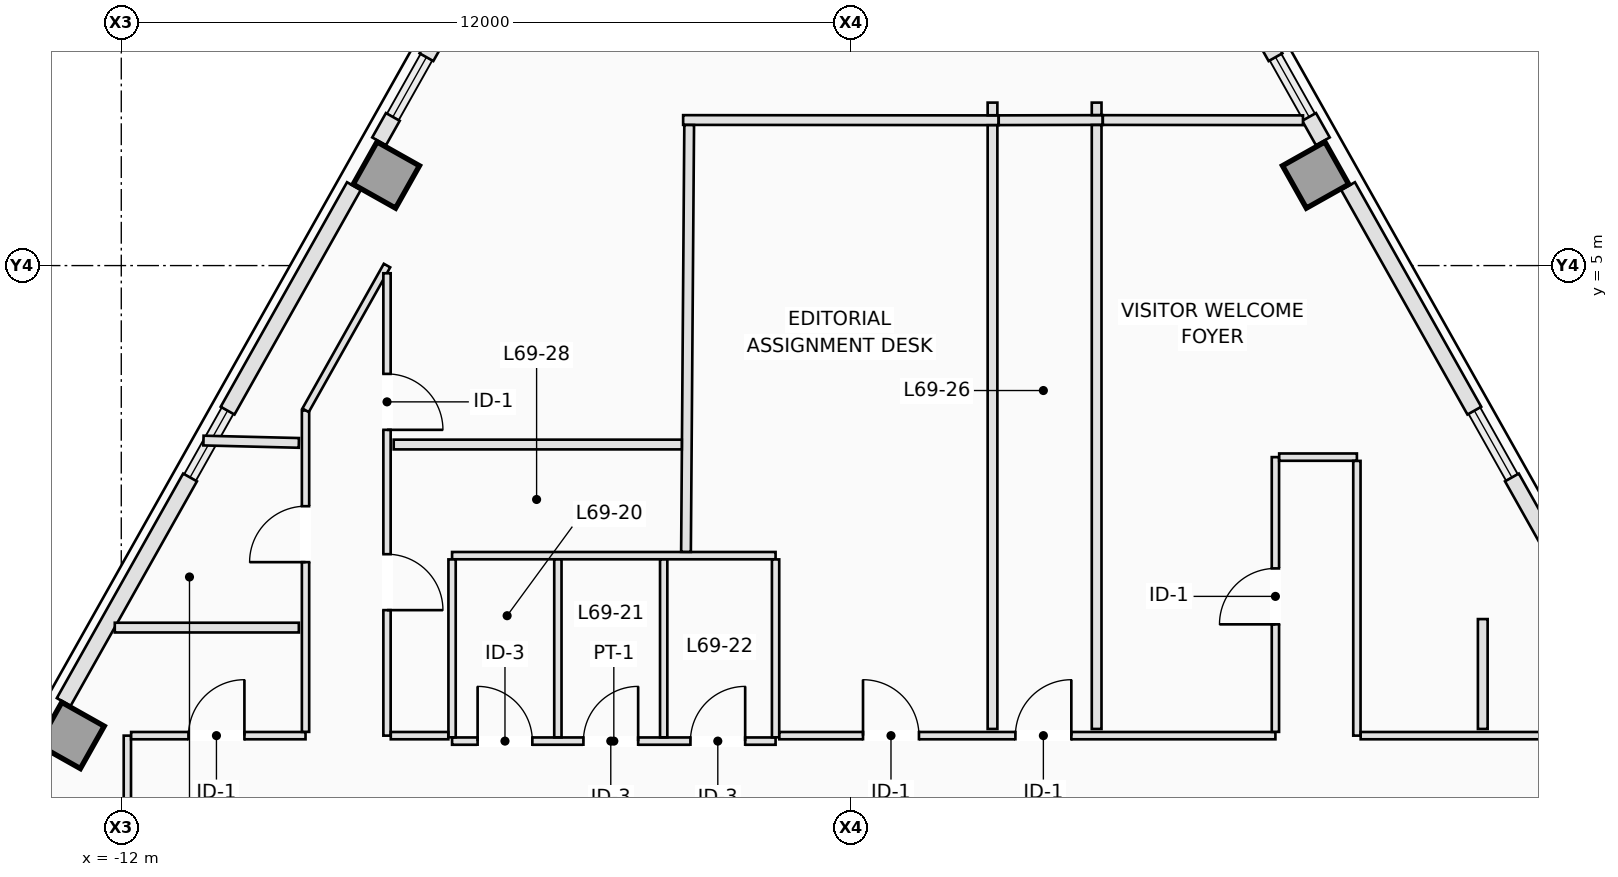
"""IFC4 building model, lengths in metres.
Left out: names, types, materials, properties, quantities, classifications, styles, units other than length and angle.
Written with IfcOpenShell. Run it as: python <this file> out.ifc"""

import sys

from ifc_helpers import new_model, si_unit, direction, frame, frame_2d, origin, origin_2d, place, context, subcontext, project, spatial, rectangle, extrude, element, fill, save


model = new_model("IFC4")
c1 = context("Model", 3, precision=1e-05, world=origin(), true_north=direction((0.0, 1.0)))
c2 = subcontext(c1, "Body", "Model", "MODEL_VIEW")
j1 = project(units=[si_unit("LENGTHUNIT", "METRE"), si_unit("PLANEANGLEUNIT", "RADIAN")], contexts=[c1])
p1 = place(None, origin())
s1 = spatial("IfcSite", under=j1, at=p1, CompositionType="ELEMENT")
p2 = place(p1, origin())
s2 = spatial("IfcBuilding", under=s1, at=p2, CompositionType="ELEMENT")
p3 = place(p2, frame((0.0, 0.0, 249.9)))
s3 = spatial("IfcBuildingStorey", under=s2, at=p3, CompositionType="ELEMENT", Elevation=249.9)
for number, where, z_axis, x_axis in (
    (1, (7.642, 6.489, 0.0), (0.0, 0.0, 1.0), (0.872, 0.49, 0.0)),
    (2, (-7.642, 6.489, 0.0), (0.0, 0.0, 1.0), (-0.872, 0.49, 0.0)),
    (3, (-12.825, -2.727, 0.0), (0.0, 0.0, 1.0), (-0.872, 0.49, 0.0)),
):
    element("IfcColumn", number, at=place(p3, frame(where, z_axis=z_axis, x_axis=x_axis)), inside=s3, PredefinedType="COLUMN", context=c2, shape_type="SweptSolid", body=[
        extrude(rectangle(XDim=0.8, YDim=0.8, at=origin_2d()), origin(), (0.0, 0.0, 1.0), 3.5),
    ])
p4 = place(p3, frame((4.33, 13.142, 0.0), z_axis=(0.0, 0.0, 1.0), x_axis=(0.490265525523, -0.871573126297, 0.0)))
e4 = element("IfcWall", 4, at=p4, inside=s3, PredefinedType="STANDARD", context=c2, shape_type="SweptSolid", body=[
    extrude(rectangle(XDim=5.409, YDim=0.26, at=frame_2d((2.705, 0.0))), origin(), (0.0, 0.0, 1.0), 3.25),
])
p5 = place(p3, frame((7.534, 7.445, 0.0), z_axis=(0.0, 0.0, 1.0), x_axis=(0.490412424957, -0.871490478116, 0.0)))
e5 = element("IfcWall", 5, at=p5, inside=s3, PredefinedType="STANDARD", context=c2, shape_type="SweptSolid", body=[
    extrude(rectangle(XDim=0.46, YDim=0.26, at=frame_2d((0.23, 0.0))), origin(), (0.0, 0.0, 1.0), 3.25),
])
p6 = place(p3, frame((8.174, 6.307, 0.0), z_axis=(0.0, 0.0, 1.0), x_axis=(0.490269447258, -0.871570920284, 0.0)))
e6 = element("IfcWall", 6, at=p6, inside=s3, PredefinedType="STANDARD", context=c2, shape_type="SweptSolid", body=[
    extrude(rectangle(XDim=4.237, YDim=0.26, at=frame_2d((2.118, 0.0))), origin(), (0.0, 0.0, 1.0), 3.25),
])
p7 = place(p3, frame((10.869, 1.516, 0.0), z_axis=(0.0, 0.0, 1.0), x_axis=(0.490244825075, -0.871584770109, 0.0)))
e7 = element("IfcWall", 7, at=p7, inside=s3, PredefinedType="STANDARD", context=c2, shape_type="SweptSolid", body=[
    extrude(rectangle(XDim=4.237, YDim=0.26, at=frame_2d((2.119, 0.0))), origin(), (0.0, 0.0, 1.0), 3.25),
])
p8 = place(p3, frame((-7.76, 7.044, 0.0), z_axis=(0.0, 0.0, 1.0), x_axis=(0.490412424957, 0.871490478116, 0.0)))
e8 = element("IfcWall", 8, at=p8, inside=s3, PredefinedType="STANDARD", context=c2, shape_type="SweptSolid", body=[
    extrude(rectangle(XDim=0.46, YDim=0.26, at=frame_2d((0.23, 0.0))), origin(), (0.0, 0.0, 1.0), 3.25),
])
p9 = place(p3, frame((-6.982, 8.427, 0.0), z_axis=(0.0, 0.0, 1.0), x_axis=(0.490265525523, 0.871573126297, 0.0)))
e9 = element("IfcWall", 9, at=p9, inside=s3, PredefinedType="STANDARD", context=c2, shape_type="SweptSolid", body=[
    extrude(rectangle(XDim=5.409, YDim=0.26, at=frame_2d((2.705, 0.0))), origin(), (0.0, 0.0, 1.0), 3.25),
])
p10 = place(p3, frame((-12.946, -2.177, 0.0), z_axis=(0.0, 0.0, 1.0), x_axis=(0.490244825075, 0.871584770109, 0.0)))
e10 = element("IfcWall", 10, at=p10, inside=s3, PredefinedType="STANDARD", context=c2, shape_type="SweptSolid", body=[
    extrude(rectangle(XDim=4.237, YDim=0.26, at=frame_2d((2.119, 0.0))), origin(), (0.0, 0.0, 1.0), 3.25),
])
p11 = place(p3, frame((-10.251, 2.615, 0.0), z_axis=(0.0, 0.0, 1.0), x_axis=(0.490269447258, 0.871570920284, 0.0)))
e11 = element("IfcWall", 11, at=p11, inside=s3, PredefinedType="STANDARD", context=c2, shape_type="SweptSolid", body=[
    extrude(rectangle(XDim=4.237, YDim=0.26, at=frame_2d((2.118, 0.0))), origin(), (0.0, 0.0, 1.0), 3.25),
])
p12 = place(p3, frame((-6.56, -2.82, 0.0), z_axis=(0.0, 0.0, 1.0), x_axis=(1.0, 0.0, 0.0)))
e12 = element("IfcWall", 12, at=p12, inside=s3, PredefinedType="PARTITIONING", context=c2, shape_type="SweptSolid", body=[
    extrude(rectangle(XDim=5.32, YDim=0.12, at=frame_2d((2.66, 0.0))), origin(), (0.0, 0.0, 1.0), 2.943),
])
p13 = place(p12, frame((0.42, 0.0, 0.0)))
e13 = element("IfcOpeningElement", 13, at=p13, cuts=e12, PredefinedType="OPENING", context=c2, shape_type="SweptSolid", body=[
    extrude(rectangle(XDim=0.9, YDim=2.12, at=frame_2d((0.45, 1.06))), frame((0.0, 0.07, 0.0), z_axis=(0.0, -1.0, 0.0), x_axis=(1.0, 0.0, 0.0)), (0.0, 0.0, 1.0), 0.14),
])
p14 = place(p12, frame((2.16, 0.0, 0.0)))
e14 = element("IfcOpeningElement", 14, at=p14, cuts=e12, PredefinedType="OPENING", context=c2, shape_type="SweptSolid", body=[
    extrude(rectangle(XDim=0.9, YDim=2.12, at=frame_2d((0.45, 1.06))), frame((0.0, 0.07, 0.0), z_axis=(0.0, -1.0, 0.0), x_axis=(1.0, 0.0, 0.0)), (0.0, 0.0, 1.0), 0.14),
])
p15 = place(p12, frame((3.92, 0.0, 0.0)))
e15 = element("IfcOpeningElement", 15, at=p15, cuts=e12, PredefinedType="OPENING", context=c2, shape_type="SweptSolid", body=[
    extrude(rectangle(XDim=0.9, YDim=2.12, at=frame_2d((0.45, 1.06))), frame((0.0, 0.07, 0.0), z_axis=(0.0, -1.0, 0.0), x_axis=(1.0, 0.0, 0.0)), (0.0, 0.0, 1.0), 0.14),
])
p16 = place(p3, frame((-6.56, 0.23, 0.0), z_axis=(0.0, 0.0, 1.0), x_axis=(1.0, 0.0, 0.0)))
e16 = element("IfcWall", 16, at=p16, inside=s3, PredefinedType="PARTITIONING", context=c2, shape_type="SweptSolid", body=[
    extrude(rectangle(XDim=5.32, YDim=0.12, at=frame_2d((2.66, 0.0))), origin(), (0.0, 0.0, 1.0), 3.25),
])
for number, where, z_axis, x_axis in (
    (17, (-6.56, -2.758, 0.0), (0.0, 0.0, 1.0), (0.0, 1.0, 0.0)),
    (18, (-4.82, -2.758, 0.0), (0.0, 0.0, 1.0), (0.0, 1.0, 0.0)),
    (19, (-3.08, -2.758, 0.0), (0.0, 0.0, 1.0), (0.0, 1.0, 0.0)),
    (20, (-1.24, -2.758, 0.0), (0.0, 0.0, 1.0), (0.0, 1.0, 0.0)),
):
    element("IfcWall", number, at=place(p3, frame(where, z_axis=z_axis, x_axis=x_axis)), inside=s3, PredefinedType="PARTITIONING", context=c2, shape_type="SweptSolid", body=[
        extrude(rectangle(XDim=2.926, YDim=0.12, at=frame_2d((1.463, 0.0))), origin(), (0.0, 0.0, 1.0), 3.25),
    ])
p17 = place(p3, frame((-11.9, -5.073, 0.0), z_axis=(0.0, 0.0, 1.0), x_axis=(0.0, 1.0, 0.0)))
e21 = element("IfcWall", 21, at=p17, inside=s3, PredefinedType="PARTITIONING", context=c2, shape_type="SweptSolid", body=[
    extrude(rectangle(XDim=2.343, YDim=0.12, at=frame_2d((1.171, 0.0))), origin(), (0.0, 0.0, 1.0), 3.25),
])
p18 = place(p3, frame((-11.838, -2.73, 0.0), z_axis=(0.0, 0.0, 1.0), x_axis=(1.0, 0.0, 0.0)))
e22 = element("IfcWall", 22, at=p18, inside=s3, PredefinedType="PARTITIONING", context=c2, shape_type="SweptSolid", body=[
    extrude(rectangle(XDim=2.868, YDim=0.12, at=frame_2d((1.434, 0.0))), origin(), (0.0, 0.0, 1.0), 3.25),
])
p19 = place(p18, frame((0.943, 0.0, 0.0)))
e23 = element("IfcOpeningElement", 23, at=p19, cuts=e22, PredefinedType="OPENING", context=c2, shape_type="SweptSolid", body=[
    extrude(rectangle(XDim=0.92, YDim=2.12, at=frame_2d((0.46, 1.06))), frame((0.0, 0.07, 0.0), z_axis=(0.0, -1.0, 0.0), x_axis=(1.0, 0.0, 0.0)), (0.0, 0.0, 1.0), 0.14),
])
p20 = place(p3, frame((-8.97, -2.668, 0.0), z_axis=(0.0, 0.0, 1.0), x_axis=(0.0, 1.0, 0.0)))
e24 = element("IfcWall", 24, at=p20, inside=s3, PredefinedType="PARTITIONING", context=c2, shape_type="SweptSolid", body=[
    extrude(rectangle(XDim=5.286, YDim=0.12, at=frame_2d((2.643, 0.0))), origin(), (0.0, 0.0, 1.0), 3.25),
])
p21 = place(p20, frame((2.791, 0.0, 0.0)))
e25 = element("IfcOpeningElement", 25, at=p21, cuts=e24, PredefinedType="OPENING", context=c2, shape_type="SweptSolid", body=[
    extrude(rectangle(XDim=0.92, YDim=2.12, at=frame_2d((0.46, 1.06))), frame((0.0, 0.07, 0.0), z_axis=(0.0, -1.0, 0.0), x_axis=(1.0, 0.0, 0.0)), (0.0, 0.0, 1.0), 0.14),
])
p22 = place(p3, frame((-8.969, 2.62, 0.0), z_axis=(0.0, 0.0, 1.0), x_axis=(0.490341880416, 0.871530171773, 0.0)))
e26 = element("IfcWall", 26, at=p22, inside=s3, PredefinedType="PARTITIONING", context=c2, shape_type="SweptSolid", body=[
    extrude(rectangle(XDim=2.731, YDim=0.12, at=frame_2d((1.365, 0.0))), origin(), (0.0, 0.0, 1.0), 3.25),
])
p23 = place(p3, frame((-7.63, 4.874, 0.0), z_axis=(0.0, 0.0, 1.0), x_axis=(0.0, -1.0, 0.0)))
e27 = element("IfcWall", 27, at=p23, inside=s3, PredefinedType="PARTITIONING", context=c2, shape_type="SweptSolid", body=[
    extrude(rectangle(XDim=7.604, YDim=0.12, at=frame_2d((3.802, 0.0))), origin(), (0.0, 0.0, 1.0), 3.25),
])
p24 = place(p23, frame((1.655, 0.0, 0.0)))
e28 = element("IfcOpeningElement", 28, at=p24, cuts=e27, PredefinedType="OPENING", context=c2, shape_type="SweptSolid", body=[
    extrude(rectangle(XDim=0.92, YDim=2.12, at=frame_2d((0.46, 1.06))), frame((0.0, 0.07, 0.0), z_axis=(0.0, -1.0, 0.0), x_axis=(1.0, 0.0, 0.0)), (0.0, 0.0, 1.0), 0.14),
])
p25 = place(p23, frame((4.62, 0.0, 0.0)))
e29 = element("IfcOpeningElement", 29, at=p25, cuts=e27, PredefinedType="OPENING", context=c2, shape_type="SweptSolid", body=[
    extrude(rectangle(XDim=0.92, YDim=2.12, at=frame_2d((0.46, 1.06))), frame((0.0, 0.07, 0.0), z_axis=(0.0, -1.0, 0.0), x_axis=(1.0, 0.0, 0.0)), (0.0, 0.0, 1.0), 0.14),
])
p26 = place(p3, frame((-7.568, -2.73, 0.0), z_axis=(0.0, 0.0, 1.0), x_axis=(1.0, 0.0, 0.0)))
e30 = element("IfcWall", 30, at=p26, inside=s3, PredefinedType="PARTITIONING", context=c2, shape_type="SweptSolid", body=[
    extrude(rectangle(XDim=0.946, YDim=0.12, at=frame_2d((0.473, 0.0))), origin(), (0.0, 0.0, 1.0), 3.25),
])
p27 = place(p3, frame((-1.178, -2.73, 0.0), z_axis=(0.0, 0.0, 1.0), x_axis=(1.0, 0.0, 0.0)))
e31 = element("IfcWall", 31, at=p27, inside=s3, PredefinedType="PARTITIONING", context=c2, shape_type="SweptSolid", body=[
    extrude(rectangle(XDim=8.158, YDim=0.12, at=frame_2d((4.079, 0.0))), origin(), (0.0, 0.0, 1.0), 2.943),
])
p28 = place(p27, frame((1.376, 0.0, 0.0)))
e32 = element("IfcOpeningElement", 32, at=p28, cuts=e31, PredefinedType="OPENING", context=c2, shape_type="SweptSolid", body=[
    extrude(rectangle(XDim=0.92, YDim=2.12, at=frame_2d((0.46, 1.06))), frame((0.0, 0.07, 0.0), z_axis=(0.0, -1.0, 0.0), x_axis=(1.0, 0.0, 0.0)), (0.0, 0.0, 1.0), 0.14),
])
p29 = place(p27, frame((3.882, 0.0, 0.0)))
e33 = element("IfcOpeningElement", 33, at=p29, cuts=e31, PredefinedType="OPENING", context=c2, shape_type="SweptSolid", body=[
    extrude(rectangle(XDim=0.92, YDim=2.12, at=frame_2d((0.46, 1.06))), frame((0.0, 0.07, 0.0), z_axis=(0.0, -1.0, 0.0), x_axis=(1.0, 0.0, 0.0)), (0.0, 0.0, 1.0), 0.14),
])
p30 = place(p3, frame((6.98, -2.668, 0.0), z_axis=(0.0, 0.0, 1.0), x_axis=(0.0, 1.0, 0.0)))
e34 = element("IfcWall", 34, at=p30, inside=s3, PredefinedType="PARTITIONING", context=c2, shape_type="SweptSolid", body=[
    extrude(rectangle(XDim=4.518, YDim=0.12, at=frame_2d((2.259, 0.0))), origin(), (0.0, 0.0, 1.0), 3.25),
])
p31 = place(p30, frame((1.768, 0.0, 0.0)))
e35 = element("IfcOpeningElement", 35, at=p31, cuts=e34, PredefinedType="OPENING", context=c2, shape_type="SweptSolid", body=[
    extrude(rectangle(XDim=0.92, YDim=2.12, at=frame_2d((0.46, 1.06))), frame((0.0, 0.07, 0.0), z_axis=(0.0, -1.0, 0.0), x_axis=(1.0, 0.0, 0.0)), (0.0, 0.0, 1.0), 0.14),
])
p32 = place(p3, frame((7.042, 1.85, 0.0), z_axis=(0.0, 0.0, 1.0), x_axis=(1.0, 0.0, 0.0)))
e36 = element("IfcWall", 36, at=p32, inside=s3, PredefinedType="PARTITIONING", context=c2, shape_type="SweptSolid", body=[
    extrude(rectangle(XDim=1.278, YDim=0.12, at=frame_2d((0.639, 0.0))), origin(), (0.0, 0.0, 1.0), 3.25),
])
p33 = place(p3, frame((8.32, 1.788, 0.0), z_axis=(0.0, 0.0, 1.0), x_axis=(0.0, -1.0, 0.0)))
e37 = element("IfcWall", 37, at=p33, inside=s3, PredefinedType="PARTITIONING", context=c2, shape_type="SweptSolid", body=[
    extrude(rectangle(XDim=4.518, YDim=0.12, at=frame_2d((2.259, 0.0))), origin(), (0.0, 0.0, 1.0), 3.25),
])
p34 = place(p3, frame((8.382, -2.73, 0.0), z_axis=(0.0, 0.0, 1.0), x_axis=(1.0, 0.0, 0.0)))
e38 = element("IfcWall", 38, at=p34, inside=s3, PredefinedType="PARTITIONING", context=c2, shape_type="SweptSolid", body=[
    extrude(rectangle(XDim=3.518, YDim=0.12, at=frame_2d((1.759, 0.0))), origin(), (0.0, 0.0, 1.0), 3.25),
])
p35 = place(p3, frame((2.427, 7.39, 0.0), z_axis=(0.0, 0.0, 1.0), x_axis=(-0.999999716487, 0.000753011835, 0.0)))
e39 = element("IfcWall", 39, at=p35, inside=s3, PredefinedType="PARTITIONING", context=c2, shape_type="SweptSolid", body=[
    extrude(rectangle(XDim=5.188, YDim=0.16, at=frame_2d((2.594, 0.0))), origin(), (0.0, 0.0, 1.0), 3.25),
])
p36 = place(p3, frame((-2.661, 7.312, 0.0), z_axis=(0.0, 0.0, 1.0), x_axis=(-0.007477531623, -0.99997204287, 0.0)))
e40 = element("IfcWall", 40, at=p36, inside=s3, PredefinedType="PARTITIONING", context=c2, shape_type="SweptSolid", body=[
    extrude(rectangle(XDim=7.02, YDim=0.16, at=frame_2d((3.51, 0.0))), origin(), (0.0, 0.0, 1.0), 3.25),
])
p37 = place(p3, frame((4.14, 7.394, 0.0), z_axis=(0.0, 0.0, 1.0), x_axis=(-0.99999800286, -0.001998568457, 0.0)))
e41 = element("IfcWall", 41, at=p37, inside=s3, PredefinedType="PARTITIONING", context=c2, shape_type="SweptSolid", body=[
    extrude(rectangle(XDim=1.71, YDim=0.16, at=frame_2d((0.855, 0.0))), origin(), (0.0, 0.0, 1.0), 3.25),
])
p38 = place(p3, frame((7.433, 7.39, 0.0), z_axis=(0.0, 0.0, 1.0), x_axis=(-0.999999460761, 0.001038498068, 0.0)))
e42 = element("IfcWall", 42, at=p38, inside=s3, PredefinedType="PARTITIONING", context=c2, shape_type="SweptSolid", body=[
    extrude(rectangle(XDim=3.291, YDim=0.16, at=frame_2d((1.646, 0.0))), origin(), (0.0, 0.0, 1.0), 3.25),
])
p39 = place(p3, frame((-2.782, 2.057, 0.0), z_axis=(0.0, 0.0, 1.0), x_axis=(-1.0, 0.0, 0.0)))
e43 = element("IfcWall", 43, at=p39, inside=s3, PredefinedType="PARTITIONING", context=c2, shape_type="SweptSolid", body=[
    extrude(rectangle(XDim=4.738, YDim=0.16, at=frame_2d((2.369, 0.0))), origin(), (0.0, 0.0, 1.0), 2.943),
])
p40 = place(p3, frame((-9.08, 2.084, 0.0), z_axis=(0.0, 0.0, 1.0), x_axis=(-0.999697673559, 0.024587831946, 0.0)))
e44 = element("IfcWall", 44, at=p40, inside=s3, PredefinedType="PARTITIONING", context=c2, shape_type="SweptSolid", body=[
    extrude(rectangle(XDim=1.569, YDim=0.16, at=frame_2d((0.784, 0.0))), origin(), (0.0, 0.0, 1.0), 3.25),
])
p41 = place(p3, frame((2.328, 7.68, 0.0), z_axis=(0.0, 0.0, 1.0), x_axis=(0.0, -1.0, 0.0)))
e45 = element("IfcWall", 45, at=p41, inside=s3, PredefinedType="PARTITIONING", context=c2, shape_type="SweptSolid", body=[
    extrude(rectangle(XDim=0.208, YDim=0.16, at=frame_2d((0.104, 0.0))), origin(), (0.0, 0.0, 1.0), 3.25),
])
p42 = place(p3, frame((2.328, 7.308, 0.0), z_axis=(0.0, 0.0, 1.0), x_axis=(0.0, -1.0, 0.0)))
e46 = element("IfcWall", 46, at=p42, inside=s3, PredefinedType="PARTITIONING", context=c2, shape_type="SweptSolid", body=[
    extrude(rectangle(XDim=9.928, YDim=0.16, at=frame_2d((4.964, 0.0))), origin(), (0.0, 0.0, 1.0), 3.25),
])
p43 = place(p3, frame((4.04, 7.68, 0.0), z_axis=(0.0, 0.0, 1.0), x_axis=(0.0, -1.0, 0.0)))
e47 = element("IfcWall", 47, at=p43, inside=s3, PredefinedType="PARTITIONING", context=c2, shape_type="SweptSolid", body=[
    extrude(rectangle(XDim=0.204, YDim=0.16, at=frame_2d((0.102, 0.0))), origin(), (0.0, 0.0, 1.0), 3.25),
])
p44 = place(p3, frame((4.04, 7.312, 0.0), z_axis=(0.0, 0.0, 1.0), x_axis=(0.0, -1.0, 0.0)))
e48 = element("IfcWall", 48, at=p44, inside=s3, PredefinedType="PARTITIONING", context=c2, shape_type="SweptSolid", body=[
    extrude(rectangle(XDim=9.932, YDim=0.16, at=frame_2d((4.966, 0.0))), origin(), (0.0, 0.0, 1.0), 3.25),
])
p45 = place(p3, frame((10.39, -0.813, 0.0), z_axis=(0.0, 0.0, 1.0), x_axis=(0.0, -1.0, 0.0)))
e49 = element("IfcWall", 49, at=p45, inside=s3, PredefinedType="PARTITIONING", context=c2, shape_type="SweptSolid", body=[
    extrude(rectangle(XDim=1.807, YDim=0.16, at=frame_2d((0.903, 0.0))), origin(), (0.0, 0.0, 1.0), 3.25),
])
p46 = place(p3, frame((-9.08, -0.953, 0.0), z_axis=(0.0, 0.0, 1.0), x_axis=(-1.0, 0.0, 0.0)))
e50 = element("IfcWall", 50, at=p46, inside=s3, PredefinedType="PARTITIONING", context=c2, shape_type="SweptSolid", body=[
    extrude(rectangle(XDim=3.027, YDim=0.16, at=frame_2d((1.513, 0.0))), origin(), (0.0, 0.0, 1.0), 3.25),
])
p47 = place(p13, origin())
e51 = element("IfcDoor", 51, at=p47, inside=s3, OperationType="SINGLE_SWING_LEFT", PredefinedType="DOOR", context=c2, shape_type="SweptSolid", body=[
    extrude(rectangle(XDim=0.9, YDim=2.12, at=frame_2d((0.45, 1.06))), frame((0.0, 0.025, 0.0), z_axis=(0.0, -1.0, 0.0), x_axis=(1.0, 0.0, 0.0)), (0.0, 0.0, 1.0), 0.05),
])
fill(e13, e51)
p48 = place(p14, origin())
e52 = element("IfcDoor", 52, at=p48, inside=s3, OperationType="SINGLE_SWING_RIGHT", PredefinedType="DOOR", context=c2, shape_type="SweptSolid", body=[
    extrude(rectangle(XDim=0.9, YDim=2.12, at=frame_2d((0.45, 1.06))), frame((0.0, 0.025, 0.0), z_axis=(0.0, -1.0, 0.0), x_axis=(1.0, 0.0, 0.0)), (0.0, 0.0, 1.0), 0.05),
])
fill(e14, e52)
p49 = place(p15, origin())
e53 = element("IfcDoor", 53, at=p49, inside=s3, OperationType="SINGLE_SWING_RIGHT", PredefinedType="DOOR", context=c2, shape_type="SweptSolid", body=[
    extrude(rectangle(XDim=0.9, YDim=2.12, at=frame_2d((0.45, 1.06))), frame((0.0, 0.025, 0.0), z_axis=(0.0, -1.0, 0.0), x_axis=(1.0, 0.0, 0.0)), (0.0, 0.0, 1.0), 0.05),
])
fill(e15, e53)
p50 = place(p24, origin())
e54 = element("IfcDoor", 54, at=p50, inside=s3, OperationType="SINGLE_SWING_RIGHT", PredefinedType="DOOR", context=c2, shape_type="SweptSolid", body=[
    extrude(rectangle(XDim=0.92, YDim=2.12, at=frame_2d((0.46, 1.06))), frame((0.0, 0.025, 0.0), z_axis=(0.0, -1.0, 0.0), x_axis=(1.0, 0.0, 0.0)), (0.0, 0.0, 1.0), 0.05),
])
fill(e28, e54)
p51 = place(p28, origin())
e55 = element("IfcDoor", 55, at=p51, inside=s3, OperationType="SINGLE_SWING_LEFT", PredefinedType="DOOR", context=c2, shape_type="SweptSolid", body=[
    extrude(rectangle(XDim=0.92, YDim=2.12, at=frame_2d((0.46, 1.06))), frame((0.0, 0.025, 0.0), z_axis=(0.0, -1.0, 0.0), x_axis=(1.0, 0.0, 0.0)), (0.0, 0.0, 1.0), 0.05),
])
fill(e32, e55)
p52 = place(p29, origin())
e56 = element("IfcDoor", 56, at=p52, inside=s3, OperationType="SINGLE_SWING_RIGHT", PredefinedType="DOOR", context=c2, shape_type="SweptSolid", body=[
    extrude(rectangle(XDim=0.92, YDim=2.12, at=frame_2d((0.46, 1.06))), frame((0.0, 0.025, 0.0), z_axis=(0.0, -1.0, 0.0), x_axis=(1.0, 0.0, 0.0)), (0.0, 0.0, 1.0), 0.05),
])
fill(e33, e56)
p53 = place(p31, origin())
e57 = element("IfcDoor", 57, at=p53, inside=s3, OperationType="SINGLE_SWING_LEFT", PredefinedType="DOOR", context=c2, shape_type="SweptSolid", body=[
    extrude(rectangle(XDim=0.92, YDim=2.12, at=frame_2d((0.46, 1.06))), frame((0.0, 0.025, 0.0), z_axis=(0.0, -1.0, 0.0), x_axis=(1.0, 0.0, 0.0)), (0.0, 0.0, 1.0), 0.05),
])
fill(e35, e57)
p54 = place(p25, origin())
e58 = element("IfcDoor", 58, at=p54, inside=s3, OperationType="SINGLE_SWING_RIGHT", PredefinedType="DOOR", context=c2, shape_type="SweptSolid", body=[
    extrude(rectangle(XDim=0.92, YDim=2.12, at=frame_2d((0.46, 1.06))), frame((0.0, 0.025, 0.0), z_axis=(0.0, -1.0, 0.0), x_axis=(1.0, 0.0, 0.0)), (0.0, 0.0, 1.0), 0.05),
])
fill(e29, e58)
p55 = place(p21, origin())
e59 = element("IfcDoor", 59, at=p55, inside=s3, OperationType="SINGLE_SWING_LEFT", PredefinedType="DOOR", context=c2, shape_type="SweptSolid", body=[
    extrude(rectangle(XDim=0.92, YDim=2.12, at=frame_2d((0.46, 1.06))), frame((0.0, 0.025, 0.0), z_axis=(0.0, -1.0, 0.0), x_axis=(1.0, 0.0, 0.0)), (0.0, 0.0, 1.0), 0.05),
])
fill(e25, e59)
p56 = place(p19, origin())
e60 = element("IfcDoor", 60, at=p56, inside=s3, OperationType="SINGLE_SWING_RIGHT", PredefinedType="DOOR", context=c2, shape_type="SweptSolid", body=[
    extrude(rectangle(XDim=0.92, YDim=2.12, at=frame_2d((0.46, 1.06))), frame((0.0, 0.025, 0.0), z_axis=(0.0, -1.0, 0.0), x_axis=(1.0, 0.0, 0.0)), (0.0, 0.0, 1.0), 0.05),
])
fill(e23, e60)
save(model, sys.argv[1])
